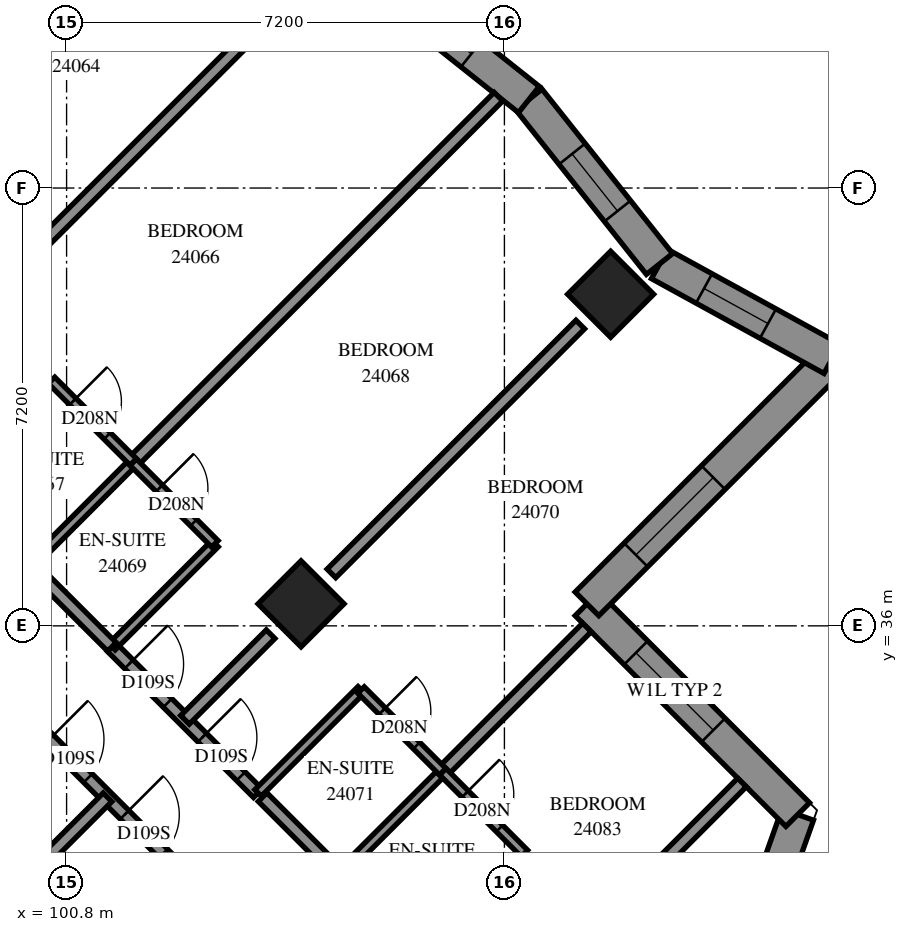
"""IFC4 building model, lengths in metres.
Left out: names, types, materials, properties, quantities, classifications, styles, units other than length and angle.
Written with IfcOpenShell. Run it as: python <this file> out.ifc"""

import sys

from ifc_helpers import new_model, si_unit, direction, frame, frame_2d, origin, origin_2d, place, context, subcontext, project, spatial, polyline, rectangle, outline, extrude, element, fill, save


model = new_model("IFC4")
c1 = context("Model", 3, precision=1e-05, world=origin(), true_north=direction((0.0, 1.0)))
c2 = subcontext(c1, "Body", "Model", "MODEL_VIEW")
j1 = project(units=[si_unit("LENGTHUNIT", "METRE"), si_unit("PLANEANGLEUNIT", "RADIAN")], contexts=[c1])
p1 = place(None, origin())
s1 = spatial("IfcSite", under=j1, at=p1, CompositionType="ELEMENT")
p2 = place(p1, origin())
s2 = spatial("IfcBuilding", under=s1, at=p2, CompositionType="ELEMENT")
p3 = place(p2, frame((0.0, 0.0, 91.4)))
s3 = spatial("IfcBuildingStorey", under=s2, at=p3, CompositionType="ELEMENT", Elevation=91.4)
for number, where, z_axis, x_axis in (
    (1, (109.747, 41.453, 0.0), (0.0, 0.0, 1.0), (0.707, -0.707, 0.0)),
    (2, (104.656, 36.362, 0.0), (0.0, 0.0, 1.0), (0.707, -0.707, 0.0)),
):
    element("IfcColumn", number, at=place(p3, frame(where, z_axis=z_axis, x_axis=x_axis)), inside=s3, PredefinedType="COLUMN", context=c2, shape_type="SweptSolid", body=[
        extrude(rectangle(XDim=1.0, YDim=1.0, at=origin_2d()), origin(), (0.0, 0.0, 1.0), 3.1),
    ])
p4 = place(p3, frame((111.052, 27.912, 0.0), z_axis=(0.0, 0.0, 1.0), x_axis=(0.334975732, 0.9422267556, 0.0)))
e3 = element("IfcWall", 3, at=p4, inside=s3, PredefinedType="SOLIDWALL", context=c2, shape_type="SweptSolid", body=[
    extrude(outline(polyline([(-0.125, -0.275), (5.464, -0.275), (5.117, 0.275), (0.125, 0.275), (-0.125, -0.275)])), origin(), (0.0, 0.0, 1.0), 3.1),
])
p5 = place(p4, frame((1.453, 0.0, 0.5)))
e4 = element("IfcOpeningElement", 4, at=p5, cuts=e3, PredefinedType="OPENING", context=c2, shape_type="SweptSolid", body=[
    extrude(rectangle(XDim=1.3, YDim=2.45, at=frame_2d((0.65, 1.225))), frame((0.0, 0.285, 0.0), z_axis=(0.0, -1.0, 0.0), x_axis=(1.0, 0.0, 0.0)), (0.0, 0.0, 1.0), 0.57),
])
p6 = place(p4, frame((2.953, 0.0, 0.5)))
e5 = element("IfcOpeningElement", 5, at=p6, cuts=e3, PredefinedType="OPENING", context=c2, shape_type="SweptSolid", body=[
    extrude(rectangle(XDim=1.3, YDim=2.45, at=frame_2d((0.65, 1.225))), frame((0.0, 0.285, 0.0), z_axis=(0.0, -1.0, 0.0), x_axis=(1.0, 0.0, 0.0)), (0.0, 0.0, 1.0), 0.57),
])
p7 = place(p3, frame((112.824, 32.896, 0.0), z_axis=(0.0, 0.0, 1.0), x_axis=(-0.7071067812, 0.7071067812, 0.0)))
e6 = element("IfcWall", 6, at=p7, inside=s3, PredefinedType="SOLIDWALL", context=c2, shape_type="SweptSolid", body=[
    extrude(outline(polyline([(-0.174, -0.275), (4.626, -0.275), (5.176, 0.275), (0.174, 0.275), (-0.174, -0.275)])), origin(), (0.0, 0.0, 1.0), 3.1),
])
p8 = place(p7, frame((1.964, 0.0, 0.6)))
e7 = element("IfcOpeningElement", 7, at=p8, cuts=e6, PredefinedType="OPENING", context=c2, shape_type="SweptSolid", body=[
    extrude(rectangle(XDim=1.8, YDim=1.9, at=frame_2d((0.9, 0.95))), frame((0.0, 0.285, 0.0), z_axis=(0.0, -1.0, 0.0), x_axis=(1.0, 0.0, 0.0)), (0.0, 0.0, 1.0), 0.57),
])
p9 = place(p3, frame((109.358, 36.362, 0.0), z_axis=(0.0, 0.0, 1.0), x_axis=(0.7071067812, 0.7071067812, 0.0)))
e8 = element("IfcWall", 8, at=p9, inside=s3, PredefinedType="SOLIDWALL", context=c2, shape_type="SweptSolid", body=[
    extrude(outline(polyline([(0.275, -0.275), (6.066, -0.275), (5.333, 0.275), (-0.275, 0.275), (0.275, -0.275)])), origin(), (0.0, 0.0, 1.0), 3.1),
])
p10 = place(p9, frame((1.137, 0.0, 0.6)))
e9 = element("IfcOpeningElement", 9, at=p10, cuts=e8, PredefinedType="OPENING", context=c2, shape_type="SweptSolid", body=[
    extrude(rectangle(XDim=1.8, YDim=1.9, at=frame_2d((0.9, 0.95))), frame((0.0, 0.285, 0.0), z_axis=(0.0, -1.0, 0.0), x_axis=(1.0, 0.0, 0.0)), (0.0, 0.0, 1.0), 0.57),
])
p11 = place(p3, frame((113.388, 40.392, 0.0), z_axis=(0.0, 0.0, 1.0), x_axis=(-0.8764290552, 0.4815310075, 0.0)))
e10 = element("IfcWall", 10, at=p11, inside=s3, PredefinedType="SOLIDWALL", context=c2, shape_type="SweptSolid", body=[
    extrude(outline(polyline([(-0.366, -0.275), (3.183, -0.275), (3.293, 0.275), (0.366, 0.275), (-0.366, -0.275)])), origin(), (0.0, 0.0, 1.0), 3.1),
])
p12 = place(p11, frame((1.202, 0.0, 0.5)))
e11 = element("IfcOpeningElement", 11, at=p12, cuts=e10, PredefinedType="OPENING", context=c2, shape_type="SweptSolid", body=[
    extrude(rectangle(XDim=1.2, YDim=2.45, at=frame_2d((0.6, 1.225))), frame((0.0, 0.285, 0.0), z_axis=(0.0, -1.0, 0.0), x_axis=(1.0, 0.0, 0.0)), (0.0, 0.0, 1.0), 0.57),
])
p13 = place(p3, frame((110.551, 41.951, 0.0), z_axis=(0.0, 0.0, 1.0), x_axis=(-0.6218910216, 0.7831037972, 0.0)))
e12 = element("IfcWall", 12, at=p13, inside=s3, PredefinedType="SOLIDWALL", context=c2, shape_type="SweptSolid", body=[
    extrude(outline(polyline([(0.055, -0.275), (3.485, -0.275), (3.422, 0.275), (-0.055, 0.275), (0.055, -0.275)])), origin(), (0.0, 0.0, 1.0), 3.1),
])
p14 = place(p13, frame((1.111, 0.0, 0.5)))
e13 = element("IfcOpeningElement", 13, at=p14, cuts=e12, PredefinedType="OPENING", context=c2, shape_type="SweptSolid", body=[
    extrude(rectangle(XDim=1.2, YDim=2.45, at=frame_2d((0.6, 1.225))), frame((0.0, 0.285, 0.0), z_axis=(0.0, -1.0, 0.0), x_axis=(1.0, 0.0, 0.0)), (0.0, 0.0, 1.0), 0.57),
])
p15 = place(p3, frame((108.403, 44.656, 0.0), z_axis=(0.0, 0.0, 1.0), x_axis=(-0.7830937263, 0.6219037031, 0.0)))
e14 = element("IfcWall", 14, at=p15, inside=s3, PredefinedType="SOLIDWALL", context=c2, shape_type="SweptSolid", body=[
    extrude(outline(polyline([(-0.032, -0.275), (3.398, -0.275), (3.462, 0.275), (0.032, 0.275), (-0.032, -0.275)])), origin(), (0.0, 0.0, 1.0), 3.1),
])
p16 = place(p15, frame((1.209, 0.0, 0.5)))
e15 = element("IfcOpeningElement", 15, at=p16, cuts=e14, PredefinedType="OPENING", context=c2, shape_type="SweptSolid", body=[
    extrude(rectangle(XDim=1.2, YDim=2.45, at=frame_2d((0.6, 1.225))), frame((0.0, 0.285, 0.0), z_axis=(0.0, -1.0, 0.0), x_axis=(1.0, 0.0, 0.0)), (0.0, 0.0, 1.0), 0.57),
])
p17 = place(p3, frame((93.339, 41.309, 0.0), z_axis=(0.0, 0.0, 1.0), x_axis=(0.7071067812, -0.7071067812, 0.0)))
e16 = element("IfcWall", 16, at=p17, inside=s3, PredefinedType="PARTITIONING", context=c2, shape_type="SweptSolid", body=[
    extrude(rectangle(XDim=18.702, YDim=0.2, at=frame_2d((9.351, 0.0))), origin(), (0.0, 0.0, 1.0), 3.1),
])
p18 = place(p17, frame((3.05, 0.0, 0.0)))
e17 = element("IfcOpeningElement", 17, at=p18, cuts=e16, PredefinedType="OPENING", context=c2, shape_type="SweptSolid", body=[
    extrude(rectangle(XDim=0.9, YDim=2.1, at=frame_2d((0.45, 1.05))), frame((0.0, 0.11, 0.0), z_axis=(0.0, -1.0, 0.0), x_axis=(1.0, 0.0, 0.0)), (0.0, 0.0, 1.0), 0.22),
])
p19 = place(p17, frame((4.7, 0.0, 0.0)))
e18 = element("IfcOpeningElement", 18, at=p19, cuts=e16, PredefinedType="OPENING", context=c2, shape_type="SweptSolid", body=[
    extrude(rectangle(XDim=0.9, YDim=2.1, at=frame_2d((0.45, 1.05))), frame((0.0, 0.11, 0.0), z_axis=(0.0, -1.0, 0.0), x_axis=(1.0, 0.0, 0.0)), (0.0, 0.0, 1.0), 0.22),
])
p20 = place(p17, frame((10.149, 0.0, 0.0)))
e19 = element("IfcOpeningElement", 19, at=p20, cuts=e16, PredefinedType="OPENING", context=c2, shape_type="SweptSolid", body=[
    extrude(rectangle(XDim=0.9, YDim=2.1, at=frame_2d((0.45, 1.05))), frame((0.0, 0.11, 0.0), z_axis=(0.0, -1.0, 0.0), x_axis=(1.0, 0.0, 0.0)), (0.0, 0.0, 1.0), 0.22),
])
p21 = place(p17, frame((11.9, 0.0, 0.0)))
e20 = element("IfcOpeningElement", 20, at=p21, cuts=e16, PredefinedType="OPENING", context=c2, shape_type="SweptSolid", body=[
    extrude(rectangle(XDim=0.9, YDim=2.1, at=frame_2d((0.45, 1.05))), frame((0.0, 0.11, 0.0), z_axis=(0.0, -1.0, 0.0), x_axis=(1.0, 0.0, 0.0)), (0.0, 0.0, 1.0), 0.22),
])
p22 = place(p17, frame((17.45, 0.0, 0.0)))
e21 = element("IfcOpeningElement", 21, at=p22, cuts=e16, PredefinedType="OPENING", context=c2, shape_type="SweptSolid", body=[
    extrude(rectangle(XDim=0.9, YDim=2.1, at=frame_2d((0.45, 1.05))), frame((0.0, 0.11, 0.0), z_axis=(0.0, -1.0, 0.0), x_axis=(1.0, 0.0, 0.0)), (0.0, 0.0, 1.0), 0.22),
])
p23 = place(p3, frame((94.615, 42.587, 0.0), z_axis=(0.0, 0.0, 1.0), x_axis=(0.7071067812, 0.7071067812, 0.0)))
e22 = element("IfcWall", 22, at=p23, inside=s3, PredefinedType="PARTITIONING", context=c2, shape_type="SweptSolid", body=[
    extrude(rectangle(XDim=9.198, YDim=0.2, at=frame_2d((4.599, 0.0))), origin(), (0.0, 0.0, 1.0), 3.1),
])
p24 = place(p23, frame((0.248, 0.0, 0.0)))
e23 = element("IfcOpeningElement", 23, at=p24, cuts=e22, PredefinedType="OPENING", context=c2, shape_type="SweptSolid", body=[
    extrude(rectangle(XDim=1.0, YDim=2.1, at=frame_2d((0.5, 1.05))), frame((0.0, 0.11, 0.0), z_axis=(0.0, -1.0, 0.0), x_axis=(1.0, 0.0, 0.0)), (0.0, 0.0, 1.0), 0.22),
])
p25 = place(p3, frame((101.896, 38.698, 0.0), z_axis=(0.0, 0.0, 1.0), x_axis=(0.7072304079, 0.7069831328, 0.0)))
e24 = element("IfcWall", 24, at=p25, inside=s3, PredefinedType="PARTITIONING", context=c2, shape_type="SweptSolid", body=[
    extrude(rectangle(XDim=8.493, YDim=0.2, at=frame_2d((4.246, 0.0))), origin(), (0.0, 0.0, 1.0), 3.1),
])
p26 = place(p3, frame((96.805, 43.787, 0.0), z_axis=(0.0, 0.0, 1.0), x_axis=(0.7071126983, 0.707100864, 0.0)))
e25 = element("IfcWall", 25, at=p26, inside=s3, PredefinedType="PARTITIONING", context=c2, shape_type="SweptSolid", body=[
    extrude(rectangle(XDim=8.45, YDim=0.2, at=frame_2d((4.225, 0.0))), origin(), (0.0, 0.0, 1.0), 3.1),
])
for number, where, z_axis, x_axis in (
    (26, (105.155, 36.863, 0.0), (0.0, 0.0, 1.0), (0.707, 0.707, 0.0)),
    (27, (100.063, 41.953, 0.0), (0.0, 0.0, 1.0), (0.707, 0.707, 0.0)),
):
    element("IfcWall", number, at=place(p3, frame(where, z_axis=z_axis, x_axis=x_axis)), inside=s3, PredefinedType="PARTITIONING", context=c2, shape_type="SweptSolid", body=[
        extrude(rectangle(XDim=5.787, YDim=0.2, at=frame_2d((2.893, 0.0))), origin(), (0.0, 0.0, 1.0), 3.1),
    ])
p27 = place(p3, frame((104.023, 33.184, 0.0), z_axis=(0.0, 0.0, 1.0), x_axis=(0.7071067812, -0.7071067812, 0.0)))
e28 = element("IfcWall", 28, at=p27, inside=s3, PredefinedType="PARTITIONING", context=c2, shape_type="SweptSolid", body=[
    extrude(rectangle(XDim=5.399, YDim=0.2, at=frame_2d((2.7, 0.0))), origin(), (0.0, 0.0, 1.0), 3.1),
])
p28 = place(p27, frame((4.08, 0.0, 0.0)))
e29 = element("IfcOpeningElement", 29, at=p28, cuts=e28, PredefinedType="OPENING", context=c2, shape_type="SweptSolid", body=[
    extrude(rectangle(XDim=0.9, YDim=2.1, at=frame_2d((0.45, 1.05))), frame((0.0, 0.11, 0.0), z_axis=(0.0, -1.0, 0.0), x_axis=(1.0, 0.0, 0.0)), (0.0, 0.0, 1.0), 0.22),
])
p29 = place(p3, frame((101.541, 35.651, 0.0), z_axis=(0.0, 0.0, 1.0), x_axis=(0.7071067812, -0.7071067812, 0.0)))
e30 = element("IfcWall", 30, at=p29, inside=s3, PredefinedType="PARTITIONING", context=c2, shape_type="SweptSolid", body=[
    extrude(rectangle(XDim=3.4, YDim=0.2, at=frame_2d((1.7, 0.0))), origin(), (0.0, 0.0, 1.0), 3.1),
])
p30 = place(p29, frame((0.4, 0.0, 0.0)))
e31 = element("IfcOpeningElement", 31, at=p30, cuts=e30, PredefinedType="OPENING", context=c2, shape_type="SweptSolid", body=[
    extrude(rectangle(XDim=0.9, YDim=2.1, at=frame_2d((0.45, 1.05))), frame((0.0, 0.11, 0.0), z_axis=(0.0, -1.0, 0.0), x_axis=(1.0, 0.0, 0.0)), (0.0, 0.0, 1.0), 0.22),
])
p31 = place(p29, frame((2.105, 0.0, 0.0)))
e32 = element("IfcOpeningElement", 32, at=p31, cuts=e30, PredefinedType="OPENING", context=c2, shape_type="SweptSolid", body=[
    extrude(rectangle(XDim=0.9, YDim=2.1, at=frame_2d((0.45, 1.05))), frame((0.0, 0.11, 0.0), z_axis=(0.0, -1.0, 0.0), x_axis=(1.0, 0.0, 0.0)), (0.0, 0.0, 1.0), 0.22),
])
p32 = place(p3, frame((106.989, 33.605, 0.0), z_axis=(0.0, 0.0, 1.0), x_axis=(0.7071067812, 0.7071067812, 0.0)))
e33 = element("IfcWall", 33, at=p32, inside=s3, PredefinedType="PARTITIONING", context=c2, shape_type="SweptSolid", body=[
    extrude(rectangle(XDim=3.35, YDim=0.2, at=frame_2d((1.675, 0.0))), origin(), (0.0, 0.0, 1.0), 3.1),
])
for number, where, z_axis, x_axis in (
    (34, (100.203, 36.997, 0.0), (0.0, 0.0, 1.0), (0.707, 0.708, 0.0)),
    (35, (105.29, 31.91, 0.0), (0.0, 0.0, 1.0), (0.708, 0.707, 0.0)),
):
    element("IfcWall", number, at=place(p3, frame(where, z_axis=z_axis, x_axis=x_axis)), inside=s3, PredefinedType="PARTITIONING", context=c2, shape_type="SweptSolid", body=[
        extrude(rectangle(XDim=2.4, YDim=0.15, at=frame_2d((1.2, 0.0))), origin(), (0.0, 0.0, 1.0), 3.1),
    ])
for number, where, z_axis, x_axis in (
    (36, (98.857, 38.343, 0.0), (0.0, 0.0, 1.0), (0.707, 0.707, 0.0)),
    (37, (101.545, 35.657, 0.0), (0.0, 0.0, 1.0), (0.707, 0.707, 0.0)),
    (38, (106.635, 30.565, 0.0), (0.0, 0.0, 1.0), (0.707, 0.707, 0.0)),
    (39, (103.949, 33.253, 0.0), (0.0, 0.0, 1.0), (0.707, 0.707, 0.0)),
):
    element("IfcWall", number, at=place(p3, frame(where, z_axis=z_axis, x_axis=x_axis)), inside=s3, PredefinedType="PARTITIONING", context=c2, shape_type="SweptSolid", body=[
        extrude(rectangle(XDim=2.398, YDim=0.15, at=frame_2d((1.199, 0.0))), origin(), (0.0, 0.0, 1.0), 3.1),
    ])
p33 = place(p3, frame((110.251, 31.767, 0.0), z_axis=(0.0, 0.0, 1.0), x_axis=(0.7066584143, 0.7075548639, 0.0)))
e40 = element("IfcWall", 40, at=p33, inside=s3, PredefinedType="PARTITIONING", context=c2, shape_type="SweptSolid", body=[
    extrude(rectangle(XDim=2.343, YDim=0.2, at=frame_2d((1.171, 0.0))), origin(), (0.0, 0.0, 1.0), 3.1),
])
p34 = place(p3, frame((100.063, 31.771, 0.0), z_axis=(0.0, 0.0, 1.0), x_axis=(0.7071067812, 0.7071067812, 0.0)))
e41 = element("IfcWall", 41, at=p34, inside=s3, PredefinedType="PARTITIONING", context=c2, shape_type="SweptSolid", body=[
    extrude(rectangle(XDim=1.994, YDim=0.2, at=frame_2d((0.997, 0.0))), origin(), (0.0, 0.0, 1.0), 3.1),
])
p35 = place(p3, frame((102.747, 34.455, 0.0), z_axis=(0.0, 0.0, 1.0), x_axis=(0.7071067812, 0.7071067812, 0.0)))
e42 = element("IfcWall", 42, at=p35, inside=s3, PredefinedType="PARTITIONING", context=c2, shape_type="SweptSolid", body=[
    extrude(rectangle(XDim=1.991, YDim=0.2, at=frame_2d((0.996, 0.0))), origin(), (0.0, 0.0, 1.0), 3.1),
])
p36 = place(p3, frame((101.894, 38.693, 0.0), z_axis=(0.0, 0.0, 1.0), x_axis=(0.7071067812, -0.7071067812, 0.0)))
e43 = element("IfcWall", 43, at=p36, inside=s3, PredefinedType="PARTITIONING", context=c2, shape_type="SweptSolid", body=[
    extrude(rectangle(XDim=1.901, YDim=0.15, at=frame_2d((0.95, 0.0))), origin(), (0.0, 0.0, 1.0), 3.1),
])
p37 = place(p36, frame((0.608, 0.0, 0.0)))
e44 = element("IfcOpeningElement", 44, at=p37, cuts=e43, PredefinedType="OPENING", context=c2, shape_type="SweptSolid", body=[
    extrude(rectangle(XDim=0.8, YDim=2.1, at=frame_2d((0.4, 1.05))), frame((0.0, 0.085, 0.0), z_axis=(0.0, -1.0, 0.0), x_axis=(1.0, 0.0, 0.0)), (0.0, 0.0, 1.0), 0.17),
])
p38 = place(p3, frame((105.642, 34.944, 0.0), z_axis=(0.0, 0.0, 1.0), x_axis=(0.7071067812, -0.7071067812, 0.0)))
e45 = element("IfcWall", 45, at=p38, inside=s3, PredefinedType="PARTITIONING", context=c2, shape_type="SweptSolid", body=[
    extrude(rectangle(XDim=1.901, YDim=0.15, at=frame_2d((0.95, 0.0))), origin(), (0.0, 0.0, 1.0), 3.1),
])
p39 = place(p38, frame((0.491, 0.0, 0.0)))
e46 = element("IfcOpeningElement", 46, at=p39, cuts=e45, PredefinedType="OPENING", context=c2, shape_type="SweptSolid", body=[
    extrude(rectangle(XDim=0.8, YDim=2.1, at=frame_2d((0.4, 1.05))), frame((0.0, 0.085, 0.0), z_axis=(0.0, -1.0, 0.0), x_axis=(1.0, 0.0, 0.0)), (0.0, 0.0, 1.0), 0.17),
])
p40 = place(p3, frame((100.553, 40.037, 0.0), z_axis=(0.0, 0.0, 1.0), x_axis=(0.7076330979, -0.7065800724, 0.0)))
e47 = element("IfcWall", 47, at=p40, inside=s3, PredefinedType="PARTITIONING", context=c2, shape_type="SweptSolid", body=[
    extrude(rectangle(XDim=1.899, YDim=0.15, at=frame_2d((0.95, 0.0))), origin(), (0.0, 0.0, 1.0), 3.1),
])
p41 = place(p40, frame((0.493, 0.0, 0.0)))
e48 = element("IfcOpeningElement", 48, at=p41, cuts=e47, PredefinedType="OPENING", context=c2, shape_type="SweptSolid", body=[
    extrude(rectangle(XDim=0.8, YDim=2.1, at=frame_2d((0.4, 1.05))), frame((0.0, 0.085, 0.0), z_axis=(0.0, -1.0, 0.0), x_axis=(1.0, 0.0, 0.0)), (0.0, 0.0, 1.0), 0.17),
])
p42 = place(p3, frame((100.201, 36.997, 0.0), z_axis=(0.0, 0.0, 1.0), x_axis=(0.7076330979, -0.7065800724, 0.0)))
e49 = element("IfcWall", 49, at=p42, inside=s3, PredefinedType="PARTITIONING", context=c2, shape_type="SweptSolid", body=[
    extrude(rectangle(XDim=1.899, YDim=0.2, at=frame_2d((0.95, 0.0))), origin(), (0.0, 0.0, 1.0), 3.1),
])
p43 = place(p3, frame((106.987, 33.602, 0.0), z_axis=(0.0, 0.0, 1.0), x_axis=(0.7065800724, -0.7076330979, 0.0)))
e50 = element("IfcWall", 50, at=p43, inside=s3, PredefinedType="PARTITIONING", context=c2, shape_type="SweptSolid", body=[
    extrude(rectangle(XDim=1.899, YDim=0.15, at=frame_2d((0.95, 0.0))), origin(), (0.0, 0.0, 1.0), 3.1),
])
p44 = place(p43, frame((0.519, 0.0, 0.0)))
e51 = element("IfcOpeningElement", 51, at=p44, cuts=e50, PredefinedType="OPENING", context=c2, shape_type="SweptSolid", body=[
    extrude(rectangle(XDim=0.8, YDim=2.1, at=frame_2d((0.4, 1.05))), frame((0.0, 0.085, 0.0), z_axis=(0.0, -1.0, 0.0), x_axis=(1.0, 0.0, 0.0)), (0.0, 0.0, 1.0), 0.17),
])
p45 = place(p8, origin())
e52 = element("IfcWindow", 52, at=p45, inside=s3, PartitioningType="SINGLE_PANEL", PredefinedType="WINDOW", context=c2, shape_type="SweptSolid", body=[
    extrude(rectangle(XDim=1.8, YDim=1.9, at=frame_2d((0.9, 0.95))), frame((0.0, 0.155, 0.0), z_axis=(0.0, -1.0, 0.0), x_axis=(1.0, 0.0, 0.0)), (0.0, 0.0, 1.0), 0.06),
])
fill(e7, e52)
p46 = place(p10, origin())
e53 = element("IfcWindow", 53, at=p46, inside=s3, PartitioningType="SINGLE_PANEL", PredefinedType="WINDOW", context=c2, shape_type="SweptSolid", body=[
    extrude(rectangle(XDim=1.8, YDim=1.9, at=frame_2d((0.9, 0.95))), frame((0.0, 0.155, 0.0), z_axis=(0.0, -1.0, 0.0), x_axis=(1.0, 0.0, 0.0)), (0.0, 0.0, 1.0), 0.06),
])
fill(e9, e53)
p47 = place(p12, origin())
e54 = element("IfcWindow", 54, at=p47, inside=s3, PartitioningType="SINGLE_PANEL", PredefinedType="WINDOW", context=c2, shape_type="SweptSolid", body=[
    extrude(rectangle(XDim=1.2, YDim=2.45, at=frame_2d((0.6, 1.225))), frame((0.0, 0.155, 0.0), z_axis=(0.0, -1.0, 0.0), x_axis=(1.0, 0.0, 0.0)), (0.0, 0.0, 1.0), 0.06),
])
fill(e11, e54)
p48 = place(p14, origin())
e55 = element("IfcWindow", 55, at=p48, inside=s3, PartitioningType="SINGLE_PANEL", PredefinedType="WINDOW", context=c2, shape_type="SweptSolid", body=[
    extrude(rectangle(XDim=1.2, YDim=2.45, at=frame_2d((0.6, 1.225))), frame((0.0, 0.155, 0.0), z_axis=(0.0, -1.0, 0.0), x_axis=(1.0, 0.0, 0.0)), (0.0, 0.0, 1.0), 0.06),
])
fill(e13, e55)
p49 = place(p16, origin())
e56 = element("IfcWindow", 56, at=p49, inside=s3, PartitioningType="SINGLE_PANEL", PredefinedType="WINDOW", context=c2, shape_type="SweptSolid", body=[
    extrude(rectangle(XDim=1.2, YDim=2.45, at=frame_2d((0.6, 1.225))), frame((0.0, 0.155, 0.0), z_axis=(0.0, -1.0, 0.0), x_axis=(1.0, 0.0, 0.0)), (0.0, 0.0, 1.0), 0.06),
])
fill(e15, e56)
p50 = place(p41, origin())
e57 = element("IfcDoor", 57, at=p50, inside=s3, OperationType="SINGLE_SWING_RIGHT", PredefinedType="DOOR", context=c2, shape_type="SweptSolid", body=[
    extrude(rectangle(XDim=0.8, YDim=2.1, at=frame_2d((0.4, 1.05))), frame((0.0, 0.025, 0.0), z_axis=(0.0, -1.0, 0.0), x_axis=(1.0, 0.0, 0.0)), (0.0, 0.0, 1.0), 0.05),
])
fill(e48, e57)
p51 = place(p30, origin())
e58 = element("IfcDoor", 58, at=p51, inside=s3, OperationType="SINGLE_SWING_RIGHT", PredefinedType="DOOR", context=c2, shape_type="SweptSolid", body=[
    extrude(rectangle(XDim=0.9, YDim=2.1, at=frame_2d((0.45, 1.05))), frame((0.0, 0.025, 0.0), z_axis=(0.0, -1.0, 0.0), x_axis=(1.0, 0.0, 0.0)), (0.0, 0.0, 1.0), 0.05),
])
fill(e31, e58)
p52 = place(p37, origin())
e59 = element("IfcDoor", 59, at=p52, inside=s3, OperationType="SINGLE_SWING_RIGHT", PredefinedType="DOOR", context=c2, shape_type="SweptSolid", body=[
    extrude(rectangle(XDim=0.8, YDim=2.1, at=frame_2d((0.4, 1.05))), frame((0.0, 0.025, 0.0), z_axis=(0.0, -1.0, 0.0), x_axis=(1.0, 0.0, 0.0)), (0.0, 0.0, 1.0), 0.05),
])
fill(e44, e59)
p53 = place(p31, origin())
e60 = element("IfcDoor", 60, at=p53, inside=s3, OperationType="SINGLE_SWING_LEFT", PredefinedType="DOOR", context=c2, shape_type="SweptSolid", body=[
    extrude(rectangle(XDim=0.9, YDim=2.1, at=frame_2d((0.45, 1.05))), frame((0.0, 0.025, 0.0), z_axis=(0.0, -1.0, 0.0), x_axis=(1.0, 0.0, 0.0)), (0.0, 0.0, 1.0), 0.05),
])
fill(e32, e60)
p54 = place(p39, origin())
e61 = element("IfcDoor", 61, at=p54, inside=s3, OperationType="SINGLE_SWING_RIGHT", PredefinedType="DOOR", context=c2, shape_type="SweptSolid", body=[
    extrude(rectangle(XDim=0.8, YDim=2.1, at=frame_2d((0.4, 1.05))), frame((0.0, 0.025, 0.0), z_axis=(0.0, -1.0, 0.0), x_axis=(1.0, 0.0, 0.0)), (0.0, 0.0, 1.0), 0.05),
])
fill(e46, e61)
p55 = place(p20, origin())
e62 = element("IfcDoor", 62, at=p55, inside=s3, OperationType="SINGLE_SWING_LEFT", PredefinedType="DOOR", context=c2, shape_type="SweptSolid", body=[
    extrude(rectangle(XDim=0.9, YDim=2.1, at=frame_2d((0.45, 1.05))), frame((0.0, 0.025, 0.0), z_axis=(0.0, -1.0, 0.0), x_axis=(1.0, 0.0, 0.0)), (0.0, 0.0, 1.0), 0.05),
])
fill(e19, e62)
p56 = place(p21, origin())
e63 = element("IfcDoor", 63, at=p56, inside=s3, OperationType="SINGLE_SWING_RIGHT", PredefinedType="DOOR", context=c2, shape_type="SweptSolid", body=[
    extrude(rectangle(XDim=0.9, YDim=2.1, at=frame_2d((0.45, 1.05))), frame((0.0, 0.025, 0.0), z_axis=(0.0, -1.0, 0.0), x_axis=(1.0, 0.0, 0.0)), (0.0, 0.0, 1.0), 0.05),
])
fill(e20, e63)
p57 = place(p44, origin())
e64 = element("IfcDoor", 64, at=p57, inside=s3, OperationType="SINGLE_SWING_RIGHT", PredefinedType="DOOR", context=c2, shape_type="SweptSolid", body=[
    extrude(rectangle(XDim=0.8, YDim=2.1, at=frame_2d((0.4, 1.05))), frame((0.0, 0.025, 0.0), z_axis=(0.0, -1.0, 0.0), x_axis=(1.0, 0.0, 0.0)), (0.0, 0.0, 1.0), 0.05),
])
fill(e51, e64)
save(model, sys.argv[1])
